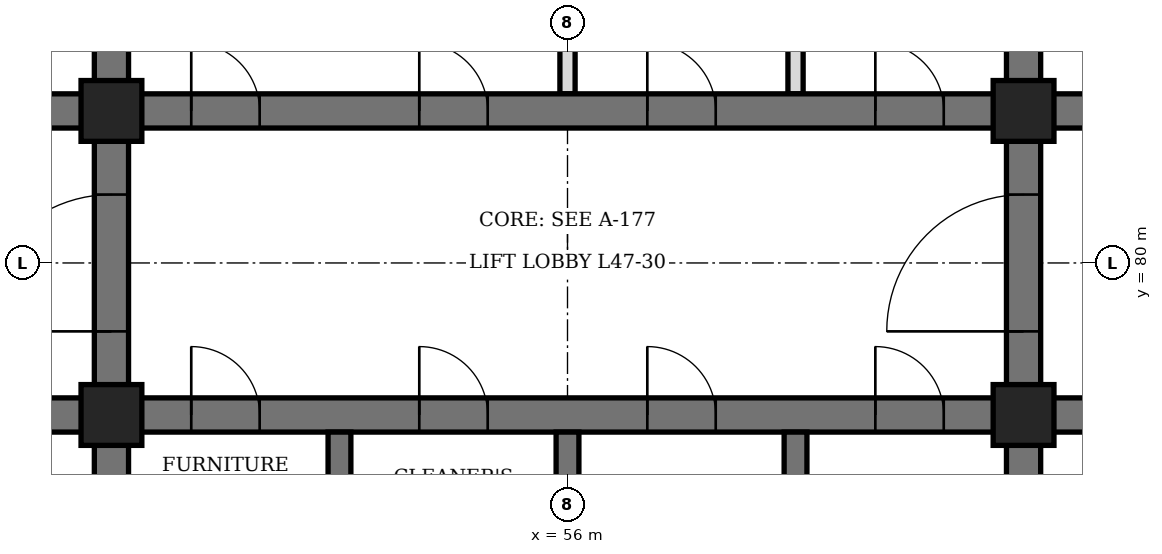
"""IFC4 building model, lengths in metres.
Left out: names, types, materials, properties, quantities, classifications, styles, units other than length and angle.
Written with IfcOpenShell. Run it as: python <this file> out.ifc"""

import sys

from ifc_helpers import new_model, si_unit, direction, frame, frame_2d, origin, origin_2d, place, context, subcontext, project, spatial, rectangle, hollow_rectangle, extrude, element, fill, save


model = new_model("IFC4")
c1 = context("Model", 3, precision=1e-05, world=origin(), true_north=direction((0.0, 1.0)))
c2 = subcontext(c1, "Body", "Model", "MODEL_VIEW")
j1 = project(units=[si_unit("LENGTHUNIT", "METRE"), si_unit("PLANEANGLEUNIT", "RADIAN")], contexts=[c1])
p1 = place(None, origin())
s1 = spatial("IfcSite", under=j1, at=p1, CompositionType="ELEMENT")
p2 = place(p1, origin())
s2 = spatial("IfcBuilding", under=s1, at=p2, CompositionType="ELEMENT")
p3 = place(p2, frame((0.0, 0.0, 210.7)))
s3 = spatial("IfcBuildingStorey", under=s2, at=p3, CompositionType="ELEMENT", Elevation=210.7)
p4 = place(p3, frame((50.0, 71.6, 0.0), z_axis=(0.0, 0.0, 1.0), x_axis=(0.0, 1.0, 0.0)))
e1 = element("IfcWall", 1, at=p4, inside=s3, PredefinedType="SHEAR", context=c2, shape_type="SweptSolid", body=[
    extrude(rectangle(XDim=16.8, YDim=0.45, at=frame_2d((8.4, 0.0))), origin(), (0.0, 0.0, 1.0), 4.2),
])
p5 = place(p4, frame((7.5, 0.0, 0.0)))
e2 = element("IfcOpeningElement", 2, at=p5, cuts=e1, PredefinedType="OPENING", context=c2, shape_type="SweptSolid", body=[
    extrude(rectangle(XDim=1.8, YDim=2.4, at=frame_2d((0.9, 1.2))), frame((0.0, 0.235, 0.0), z_axis=(0.0, -1.0, 0.0), x_axis=(1.0, 0.0, 0.0)), (0.0, 0.0, 1.0), 0.47),
])
p6 = place(p3, frame((62.0, 71.6, 0.0), z_axis=(0.0, 0.0, 1.0), x_axis=(0.0, 1.0, 0.0)))
e3 = element("IfcWall", 3, at=p6, inside=s3, PredefinedType="SHEAR", context=c2, shape_type="SweptSolid", body=[
    extrude(rectangle(XDim=16.8, YDim=0.45, at=frame_2d((8.4, 0.0))), origin(), (0.0, 0.0, 1.0), 4.2),
])
p7 = place(p6, frame((7.5, 0.0, 0.0)))
e4 = element("IfcOpeningElement", 4, at=p7, cuts=e3, PredefinedType="OPENING", context=c2, shape_type="SweptSolid", body=[
    extrude(rectangle(XDim=1.8, YDim=2.4, at=frame_2d((0.9, 1.2))), frame((0.0, 0.235, 0.0), z_axis=(0.0, -1.0, 0.0), x_axis=(1.0, 0.0, 0.0)), (0.0, 0.0, 1.0), 0.47),
])
p8 = place(p3, frame((44.6, 78.0, 0.0), z_axis=(0.0, 0.0, 1.0), x_axis=(1.0, 0.0, 0.0)))
e5 = element("IfcWall", 5, at=p8, inside=s3, PredefinedType="SHEAR", context=c2, shape_type="SweptSolid", body=[
    extrude(rectangle(XDim=5.175, YDim=0.45, at=frame_2d((2.587, 0.0))), origin(), (0.0, 0.0, 1.0), 4.2),
])
p9 = place(p8, frame((1.8, 0.0, 0.0)))
e6 = element("IfcOpeningElement", 6, at=p9, cuts=e5, PredefinedType="OPENING", context=c2, shape_type="SweptSolid", body=[
    extrude(rectangle(XDim=1.2, YDim=2.1, at=frame_2d((0.6, 1.05))), frame((0.0, 0.235, 0.0), z_axis=(0.0, -1.0, 0.0), x_axis=(1.0, 0.0, 0.0)), (0.0, 0.0, 1.0), 0.47),
])
p10 = place(p3, frame((44.6, 82.0, 0.0), z_axis=(0.0, 0.0, 1.0), x_axis=(1.0, 0.0, 0.0)))
e7 = element("IfcWall", 7, at=p10, inside=s3, PredefinedType="SHEAR", context=c2, shape_type="SweptSolid", body=[
    extrude(rectangle(XDim=5.175, YDim=0.45, at=frame_2d((2.587, 0.0))), origin(), (0.0, 0.0, 1.0), 4.2),
])
p11 = place(p10, frame((0.7, 0.0, 0.0)))
e8 = element("IfcOpeningElement", 8, at=p11, cuts=e7, PredefinedType="OPENING", context=c2, shape_type="SweptSolid", body=[
    extrude(rectangle(XDim=0.9, YDim=2.1, at=frame_2d((0.45, 1.05))), frame((0.0, 0.235, 0.0), z_axis=(0.0, -1.0, 0.0), x_axis=(1.0, 0.0, 0.0)), (0.0, 0.0, 1.0), 0.47),
])
p12 = place(p3, frame((62.225, 78.0, 0.0), z_axis=(0.0, 0.0, 1.0), x_axis=(1.0, 0.0, 0.0)))
e9 = element("IfcWall", 9, at=p12, inside=s3, PredefinedType="SHEAR", context=c2, shape_type="SweptSolid", body=[
    extrude(rectangle(XDim=5.175, YDim=0.45, at=frame_2d((2.587, 0.0))), origin(), (0.0, 0.0, 1.0), 4.2),
])
p13 = place(p12, frame((2.175, 0.0, 0.0)))
e10 = element("IfcOpeningElement", 10, at=p13, cuts=e9, PredefinedType="OPENING", context=c2, shape_type="SweptSolid", body=[
    extrude(rectangle(XDim=1.2, YDim=2.1, at=frame_2d((0.6, 1.05))), frame((0.0, 0.235, 0.0), z_axis=(0.0, -1.0, 0.0), x_axis=(1.0, 0.0, 0.0)), (0.0, 0.0, 1.0), 0.47),
])
p14 = place(p3, frame((62.225, 82.0, 0.0), z_axis=(0.0, 0.0, 1.0), x_axis=(1.0, 0.0, 0.0)))
e11 = element("IfcWall", 11, at=p14, inside=s3, PredefinedType="SHEAR", context=c2, shape_type="SweptSolid", body=[
    extrude(rectangle(XDim=5.175, YDim=0.45, at=frame_2d((2.587, 0.0))), origin(), (0.0, 0.0, 1.0), 4.2),
])
p15 = place(p14, frame((2.175, 0.0, 0.0)))
e12 = element("IfcOpeningElement", 12, at=p15, cuts=e11, PredefinedType="OPENING", context=c2, shape_type="SweptSolid", body=[
    extrude(rectangle(XDim=1.2, YDim=2.1, at=frame_2d((0.6, 1.05))), frame((0.0, 0.235, 0.0), z_axis=(0.0, -1.0, 0.0), x_axis=(1.0, 0.0, 0.0)), (0.0, 0.0, 1.0), 0.47),
])
p16 = place(p3, frame((50.225, 78.0, 0.0), z_axis=(0.0, 0.0, 1.0), x_axis=(1.0, 0.0, 0.0)))
e13 = element("IfcWall", 13, at=p16, inside=s3, PredefinedType="SHEAR", context=c2, shape_type="SweptSolid", body=[
    extrude(rectangle(XDim=11.55, YDim=0.45, at=frame_2d((5.775, 0.0))), origin(), (0.0, 0.0, 1.0), 4.2),
])
p17 = place(p16, frame((0.825, 0.0, 0.0)))
e14 = element("IfcOpeningElement", 14, at=p17, cuts=e13, PredefinedType="OPENING", context=c2, shape_type="SweptSolid", body=[
    extrude(rectangle(XDim=0.9, YDim=2.1, at=frame_2d((0.45, 1.05))), frame((0.0, 0.235, 0.0), z_axis=(0.0, -1.0, 0.0), x_axis=(1.0, 0.0, 0.0)), (0.0, 0.0, 1.0), 0.47),
])
p18 = place(p16, frame((3.825, 0.0, 0.0)))
e15 = element("IfcOpeningElement", 15, at=p18, cuts=e13, PredefinedType="OPENING", context=c2, shape_type="SweptSolid", body=[
    extrude(rectangle(XDim=0.9, YDim=2.1, at=frame_2d((0.45, 1.05))), frame((0.0, 0.235, 0.0), z_axis=(0.0, -1.0, 0.0), x_axis=(1.0, 0.0, 0.0)), (0.0, 0.0, 1.0), 0.47),
])
p19 = place(p16, frame((6.825, 0.0, 0.0)))
e16 = element("IfcOpeningElement", 16, at=p19, cuts=e13, PredefinedType="OPENING", context=c2, shape_type="SweptSolid", body=[
    extrude(rectangle(XDim=0.9, YDim=2.1, at=frame_2d((0.45, 1.05))), frame((0.0, 0.235, 0.0), z_axis=(0.0, -1.0, 0.0), x_axis=(1.0, 0.0, 0.0)), (0.0, 0.0, 1.0), 0.47),
])
p20 = place(p16, frame((9.825, 0.0, 0.0)))
e17 = element("IfcOpeningElement", 17, at=p20, cuts=e13, PredefinedType="OPENING", context=c2, shape_type="SweptSolid", body=[
    extrude(rectangle(XDim=0.9, YDim=2.1, at=frame_2d((0.45, 1.05))), frame((0.0, 0.235, 0.0), z_axis=(0.0, -1.0, 0.0), x_axis=(1.0, 0.0, 0.0)), (0.0, 0.0, 1.0), 0.47),
])
p21 = place(p3, frame((50.225, 82.0, 0.0), z_axis=(0.0, 0.0, 1.0), x_axis=(1.0, 0.0, 0.0)))
e18 = element("IfcWall", 18, at=p21, inside=s3, PredefinedType="SHEAR", context=c2, shape_type="SweptSolid", body=[
    extrude(rectangle(XDim=11.55, YDim=0.45, at=frame_2d((5.775, 0.0))), origin(), (0.0, 0.0, 1.0), 4.2),
])
p22 = place(p21, frame((0.825, 0.0, 0.0)))
e19 = element("IfcOpeningElement", 19, at=p22, cuts=e18, PredefinedType="OPENING", context=c2, shape_type="SweptSolid", body=[
    extrude(rectangle(XDim=0.9, YDim=2.1, at=frame_2d((0.45, 1.05))), frame((0.0, 0.235, 0.0), z_axis=(0.0, -1.0, 0.0), x_axis=(1.0, 0.0, 0.0)), (0.0, 0.0, 1.0), 0.47),
])
p23 = place(p21, frame((3.825, 0.0, 0.0)))
e20 = element("IfcOpeningElement", 20, at=p23, cuts=e18, PredefinedType="OPENING", context=c2, shape_type="SweptSolid", body=[
    extrude(rectangle(XDim=0.9, YDim=2.1, at=frame_2d((0.45, 1.05))), frame((0.0, 0.235, 0.0), z_axis=(0.0, -1.0, 0.0), x_axis=(1.0, 0.0, 0.0)), (0.0, 0.0, 1.0), 0.47),
])
p24 = place(p21, frame((6.825, 0.0, 0.0)))
e21 = element("IfcOpeningElement", 21, at=p24, cuts=e18, PredefinedType="OPENING", context=c2, shape_type="SweptSolid", body=[
    extrude(rectangle(XDim=0.9, YDim=2.1, at=frame_2d((0.45, 1.05))), frame((0.0, 0.235, 0.0), z_axis=(0.0, -1.0, 0.0), x_axis=(1.0, 0.0, 0.0)), (0.0, 0.0, 1.0), 0.47),
])
p25 = place(p21, frame((9.825, 0.0, 0.0)))
e22 = element("IfcOpeningElement", 22, at=p25, cuts=e18, PredefinedType="OPENING", context=c2, shape_type="SweptSolid", body=[
    extrude(rectangle(XDim=0.9, YDim=2.1, at=frame_2d((0.45, 1.05))), frame((0.0, 0.235, 0.0), z_axis=(0.0, -1.0, 0.0), x_axis=(1.0, 0.0, 0.0)), (0.0, 0.0, 1.0), 0.47),
])
for number, where, z_axis, x_axis in (
    (23, (53.0, 74.15, 0.0), (0.0, 0.0, 1.0), (0.0, 1.0, 0.0)),
    (24, (56.0, 74.15, 0.0), (0.0, 0.0, 1.0), (0.0, 1.0, 0.0)),
    (25, (59.0, 74.15, 0.0), (0.0, 0.0, 1.0), (0.0, 1.0, 0.0)),
):
    element("IfcWall", number, at=place(p3, frame(where, z_axis=z_axis, x_axis=x_axis)), inside=s3, PredefinedType="SHEAR", context=c2, shape_type="SweptSolid", body=[
        extrude(rectangle(XDim=3.625, YDim=0.3, at=frame_2d((1.812, 0.0))), origin(), (0.0, 0.0, 1.0), 4.2),
    ])
for number, where, z_axis, x_axis in (
    (26, (50.0, 78.0, 0.0), (0.0, 0.0, 1.0), (1.0, 0.0, 0.0)),
    (27, (50.0, 82.0, 0.0), (0.0, 0.0, 1.0), (1.0, 0.0, 0.0)),
    (28, (62.0, 78.0, 0.0), (0.0, 0.0, 1.0), (1.0, 0.0, 0.0)),
    (29, (62.0, 82.0, 0.0), (0.0, 0.0, 1.0), (1.0, 0.0, 0.0)),
):
    element("IfcColumn", number, at=place(p3, frame(where, z_axis=z_axis, x_axis=x_axis)), inside=s3, PredefinedType="COLUMN", context=c2, shape_type="SweptSolid", body=[
        extrude(hollow_rectangle(XDim=0.8, YDim=0.8, WallThickness=0.1, at=origin_2d()), origin(), (0.0, 0.0, 1.0), 4.2),
    ])
p26 = place(p3, frame((56.0, 82.225, 0.0), z_axis=(0.0, 0.0, 1.0), x_axis=(0.0, 1.0, 0.0)))
e30 = element("IfcWall", 30, at=p26, inside=s3, PredefinedType="PARTITIONING", context=c2, shape_type="SweptSolid", body=[
    extrude(rectangle(XDim=3.55, YDim=0.2, at=frame_2d((1.775, 0.0))), origin(), (0.0, 0.0, 1.0), 3.14),
])
p27 = place(p3, frame((59.0, 82.225, 0.0), z_axis=(0.0, 0.0, 1.0), x_axis=(0.0, 1.0, 0.0)))
e31 = element("IfcWall", 31, at=p27, inside=s3, PredefinedType="PARTITIONING", context=c2, shape_type="SweptSolid", body=[
    extrude(rectangle(XDim=3.55, YDim=0.2, at=frame_2d((1.775, 0.0))), origin(), (0.0, 0.0, 1.0), 4.04),
])
p28 = place(p17, origin())
e32 = element("IfcDoor", 32, at=p28, inside=s3, OperationType="SINGLE_SWING_LEFT", PredefinedType="DOOR", context=c2, shape_type="SweptSolid", body=[
    extrude(rectangle(XDim=0.9, YDim=2.1, at=frame_2d((0.45, 1.05))), frame((0.0, 0.225, 0.0), z_axis=(0.0, -1.0, 0.0), x_axis=(1.0, 0.0, 0.0)), (0.0, 0.0, 1.0), 0.449),
])
fill(e14, e32)
p29 = place(p18, origin())
e33 = element("IfcDoor", 33, at=p29, inside=s3, OperationType="SINGLE_SWING_LEFT", PredefinedType="DOOR", context=c2, shape_type="SweptSolid", body=[
    extrude(rectangle(XDim=0.9, YDim=2.1, at=frame_2d((0.45, 1.05))), frame((0.0, 0.225, 0.0), z_axis=(0.0, -1.0, 0.0), x_axis=(1.0, 0.0, 0.0)), (0.0, 0.0, 1.0), 0.449),
])
fill(e15, e33)
p30 = place(p19, origin())
e34 = element("IfcDoor", 34, at=p30, inside=s3, OperationType="SINGLE_SWING_LEFT", PredefinedType="DOOR", context=c2, shape_type="SweptSolid", body=[
    extrude(rectangle(XDim=0.9, YDim=2.1, at=frame_2d((0.45, 1.05))), frame((0.0, 0.225, 0.0), z_axis=(0.0, -1.0, 0.0), x_axis=(1.0, 0.0, 0.0)), (0.0, 0.0, 1.0), 0.449),
])
fill(e16, e34)
p31 = place(p20, origin())
e35 = element("IfcDoor", 35, at=p31, inside=s3, OperationType="SINGLE_SWING_LEFT", PredefinedType="DOOR", context=c2, shape_type="SweptSolid", body=[
    extrude(rectangle(XDim=0.9, YDim=2.1, at=frame_2d((0.45, 1.05))), frame((0.0, 0.225, 0.0), z_axis=(0.0, -1.0, 0.0), x_axis=(1.0, 0.0, 0.0)), (0.0, 0.0, 1.0), 0.449),
])
fill(e17, e35)
p32 = place(p22, origin())
e36 = element("IfcDoor", 36, at=p32, inside=s3, OperationType="SINGLE_SWING_LEFT", PredefinedType="DOOR", context=c2, shape_type="SweptSolid", body=[
    extrude(rectangle(XDim=0.9, YDim=2.1, at=frame_2d((0.45, 1.05))), frame((0.0, 0.225, 0.0), z_axis=(0.0, -1.0, 0.0), x_axis=(1.0, 0.0, 0.0)), (0.0, 0.0, 1.0), 0.449),
])
fill(e19, e36)
p33 = place(p23, origin())
e37 = element("IfcDoor", 37, at=p33, inside=s3, OperationType="SINGLE_SWING_LEFT", PredefinedType="DOOR", context=c2, shape_type="SweptSolid", body=[
    extrude(rectangle(XDim=0.9, YDim=2.1, at=frame_2d((0.45, 1.05))), frame((0.0, 0.225, 0.0), z_axis=(0.0, -1.0, 0.0), x_axis=(1.0, 0.0, 0.0)), (0.0, 0.0, 1.0), 0.449),
])
fill(e20, e37)
p34 = place(p24, origin())
e38 = element("IfcDoor", 38, at=p34, inside=s3, OperationType="SINGLE_SWING_LEFT", PredefinedType="DOOR", context=c2, shape_type="SweptSolid", body=[
    extrude(rectangle(XDim=0.9, YDim=2.1, at=frame_2d((0.45, 1.05))), frame((0.0, 0.225, 0.0), z_axis=(0.0, -1.0, 0.0), x_axis=(1.0, 0.0, 0.0)), (0.0, 0.0, 1.0), 0.449),
])
fill(e21, e38)
p35 = place(p25, origin())
e39 = element("IfcDoor", 39, at=p35, inside=s3, OperationType="SINGLE_SWING_LEFT", PredefinedType="DOOR", context=c2, shape_type="SweptSolid", body=[
    extrude(rectangle(XDim=0.9, YDim=2.1, at=frame_2d((0.45, 1.05))), frame((0.0, 0.225, 0.0), z_axis=(0.0, -1.0, 0.0), x_axis=(1.0, 0.0, 0.0)), (0.0, 0.0, 1.0), 0.449),
])
fill(e22, e39)
p36 = place(p5, origin())
e40 = element("IfcDoor", 40, at=p36, inside=s3, OperationType="DOUBLE_DOOR_SINGLE_SWING", PredefinedType="DOOR", context=c2, shape_type="SweptSolid", body=[
    extrude(rectangle(XDim=1.8, YDim=2.4, at=frame_2d((0.9, 1.2))), frame((0.0, 0.225, 0.0), z_axis=(0.0, -1.0, 0.0), x_axis=(1.0, 0.0, 0.0)), (0.0, 0.0, 1.0), 0.449),
])
fill(e2, e40)
p37 = place(p7, origin())
e41 = element("IfcDoor", 41, at=p37, inside=s3, OperationType="DOUBLE_DOOR_SINGLE_SWING", PredefinedType="DOOR", context=c2, shape_type="SweptSolid", body=[
    extrude(rectangle(XDim=1.8, YDim=2.4, at=frame_2d((0.9, 1.2))), frame((0.0, 0.225, 0.0), z_axis=(0.0, -1.0, 0.0), x_axis=(1.0, 0.0, 0.0)), (0.0, 0.0, 1.0), 0.449),
])
fill(e4, e41)
save(model, sys.argv[1])
